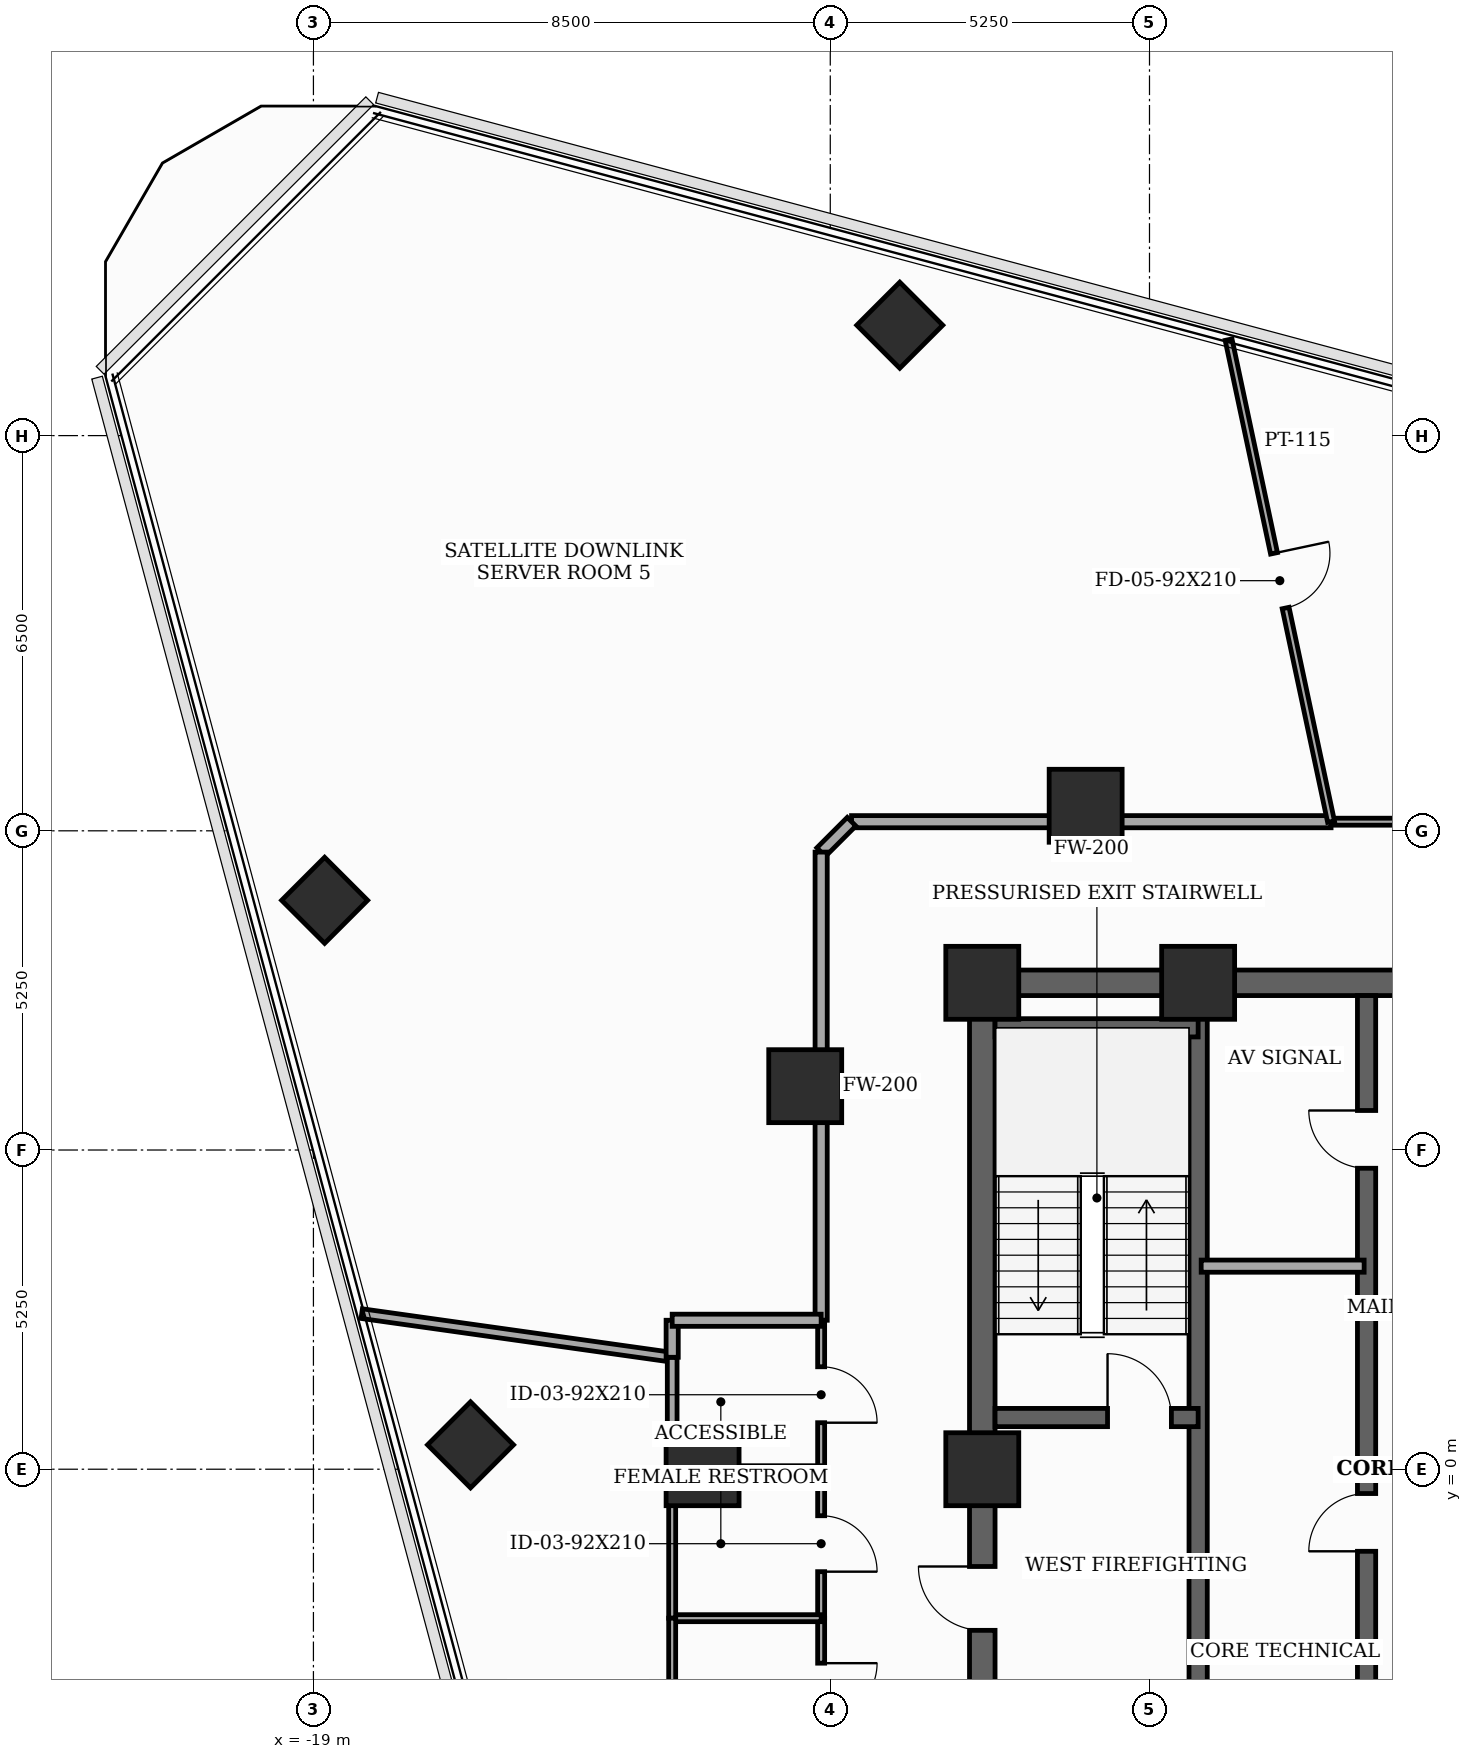
"""IFC4 building model, lengths in metres.
Left out: names, types, materials, properties, quantities, classifications, styles, units other than length and angle.
Written with IfcOpenShell. Run it as: python <this file> out.ifc"""

import sys

from ifc_helpers import new_model, si_unit, direction, frame, frame_2d, origin, origin_2d, place, context, subcontext, project, spatial, rectangle, extrude, element, fill, save


model = new_model("IFC4")
c1 = context("Model", 3, precision=1e-05, world=origin(), true_north=direction((0.0, 1.0)))
c2 = subcontext(c1, "Body", "Model", "MODEL_VIEW")
j1 = project(units=[si_unit("LENGTHUNIT", "METRE"), si_unit("PLANEANGLEUNIT", "RADIAN")], contexts=[c1])
p1 = place(None, origin())
s1 = spatial("IfcSite", under=j1, at=p1, CompositionType="ELEMENT")
p2 = place(p1, origin())
s2 = spatial("IfcBuilding", under=s1, at=p2, CompositionType="ELEMENT")
p3 = place(p2, frame((0.0, 0.0, 202.7)))
s3 = spatial("IfcBuildingStorey", under=s2, at=p3, CompositionType="ELEMENT", Elevation=202.7)
for number, where, z_axis, x_axis in (
    (1, (-4.45, 8.0, 0.0), (0.0, 0.0, 1.0), (1.0, 0.0, 0.0)),
    (2, (-8.0, 8.0, 0.0), (0.0, 0.0, 1.0), (1.0, 0.0, 0.0)),
    (3, (-8.0, 0.0, 0.0), (0.0, 0.0, 1.0), (1.0, 0.0, 0.0)),
    (4, (-6.3, 10.912, 0.0), (0.0, 0.0, 1.0), (1.0, 0.0, 0.0)),
    (5, (-10.912, 6.3, 0.0), (0.0, 0.0, 1.0), (1.0, 0.0, 0.0)),
    (6, (-12.6, 0.0, 0.0), (0.0, 0.0, 1.0), (1.0, 0.0, 0.0)),
):
    element("IfcColumn", number, at=place(p3, frame(where, z_axis=z_axis, x_axis=x_axis)), inside=s3, PredefinedType="COLUMN", context=c2, shape_type="SweptSolid", body=[
        extrude(rectangle(XDim=1.2, YDim=1.2, at=origin_2d()), origin(), (0.0, 0.0, 1.0), 3.7),
    ])
for number, where, z_axis, x_axis in (
    (7, (-9.357, 18.816, 0.0), (0.0, 0.0, 1.0), (0.707, 0.707, 0.0)),
    (8, (-18.816, 9.357, 0.0), (0.0, 0.0, 1.0), (0.707, 0.707, 0.0)),
    (9, (-16.416, 0.401, 0.0), (0.0, 0.0, 1.0), (0.707, 0.707, 0.0)),
):
    element("IfcColumn", number, at=place(p3, frame(where, z_axis=z_axis, x_axis=x_axis)), inside=s3, PredefinedType="COLUMN", context=c2, shape_type="SweptSolid", body=[
        extrude(rectangle(XDim=1.0, YDim=1.0, at=origin_2d()), origin(), (0.0, 0.0, 1.0), 3.7),
    ])
p4 = place(p3, frame((-8.0, -8.0, 0.0), z_axis=(0.0, 0.0, 1.0), x_axis=(0.0, 1.0, 0.0)))
e10 = element("IfcWall", 10, at=p4, inside=s3, PredefinedType="SHEAR", context=c2, shape_type="SweptSolid", body=[
    extrude(rectangle(XDim=16.0, YDim=0.42, at=frame_2d((8.0, 0.0))), origin(), (0.0, 0.0, 1.0), 3.5),
])
p5 = place(p4, frame((0.761, 0.0, 0.0)))
e11 = element("IfcOpeningElement", 11, at=p5, cuts=e10, PredefinedType="OPENING", context=c2, shape_type="SweptSolid", body=[
    extrude(rectangle(XDim=0.85, YDim=2.02, at=frame_2d((0.425, 1.01))), frame((0.0, 0.22, 0.0), z_axis=(0.0, -1.0, 0.0), x_axis=(1.0, 0.0, 0.0)), (0.0, 0.0, 1.0), 0.44),
])
p6 = place(p4, frame((5.35, 0.0, 0.0)))
e12 = element("IfcOpeningElement", 12, at=p6, cuts=e10, PredefinedType="OPENING", context=c2, shape_type="SweptSolid", body=[
    extrude(rectangle(XDim=1.05, YDim=2.15, at=frame_2d((0.525, 1.075))), frame((0.0, 0.22, 0.0), z_axis=(0.0, -1.0, 0.0), x_axis=(1.0, 0.0, 0.0)), (0.0, 0.0, 1.0), 0.44),
])
p7 = place(p3, frame((-8.0, 8.0, 0.0), z_axis=(0.0, 0.0, 1.0), x_axis=(1.0, 0.0, 0.0)))
e13 = element("IfcWall", 13, at=p7, inside=s3, PredefinedType="SHEAR", context=c2, shape_type="SweptSolid", body=[
    extrude(rectangle(XDim=16.0, YDim=0.42, at=frame_2d((8.0, 0.0))), origin(), (0.0, 0.0, 1.0), 3.5),
])
p8 = place(p7, frame((7.1, 0.0, 0.0)))
e14 = element("IfcOpeningElement", 14, at=p8, cuts=e13, PredefinedType="OPENING", context=c2, shape_type="SweptSolid", body=[
    extrude(rectangle(XDim=1.8, YDim=2.15, at=frame_2d((0.9, 1.075))), frame((0.0, 0.22, 0.0), z_axis=(0.0, -1.0, 0.0), x_axis=(1.0, 0.0, 0.0)), (0.0, 0.0, 1.0), 0.44),
])
p9 = place(p3, frame((-4.45, -7.79, 0.0), z_axis=(0.0, 0.0, 1.0), x_axis=(0.0, 1.0, 0.0)))
e15 = element("IfcWall", 15, at=p9, inside=s3, PredefinedType="SHEAR", context=c2, shape_type="SweptSolid", body=[
    extrude(rectangle(XDim=15.58, YDim=0.3, at=frame_2d((7.79, 0.0))), origin(), (0.0, 0.0, 1.0), 3.5),
])
p10 = place(p3, frame((-7.79, 0.85, 0.0), z_axis=(0.0, 0.0, 1.0), x_axis=(1.0, 0.0, 0.0)))
e16 = element("IfcWall", 16, at=p10, inside=s3, PredefinedType="SHEAR", context=c2, shape_type="SweptSolid", body=[
    extrude(rectangle(XDim=3.34, YDim=0.3, at=frame_2d((1.67, 0.0))), origin(), (0.0, 0.0, 1.0), 3.5),
])
p11 = place(p10, frame((1.85, 0.0, 0.0)))
e17 = element("IfcOpeningElement", 17, at=p11, cuts=e16, PredefinedType="OPENING", context=c2, shape_type="SweptSolid", body=[
    extrude(rectangle(XDim=1.05, YDim=2.15, at=frame_2d((0.525, 1.075))), frame((0.0, 0.16, 0.0), z_axis=(0.0, -1.0, 0.0), x_axis=(1.0, 0.0, 0.0)), (0.0, 0.0, 1.0), 0.32),
])
p12 = place(p3, frame((-7.79, 7.26, 0.0), z_axis=(0.0, 0.0, 1.0), x_axis=(1.0, 0.0, 0.0)))
e18 = element("IfcWall", 18, at=p12, inside=s3, PredefinedType="SHEAR", context=c2, shape_type="SweptSolid", body=[
    extrude(rectangle(XDim=3.34, YDim=0.3, at=frame_2d((1.67, 0.0))), origin(), (0.0, 0.0, 1.0), 3.5),
])
p13 = place(p3, frame((-1.68, -4.85, 0.0), z_axis=(0.0, 0.0, 1.0), x_axis=(0.0, 1.0, 0.0)))
e19 = element("IfcWall", 19, at=p13, inside=s3, PredefinedType="SHEAR", context=c2, shape_type="SweptSolid", body=[
    extrude(rectangle(XDim=12.64, YDim=0.3, at=frame_2d((6.32, 0.0))), origin(), (0.0, 0.0, 1.0), 3.5),
])
p14 = place(p13, frame((3.5, 0.0, 0.0)))
e20 = element("IfcOpeningElement", 20, at=p14, cuts=e19, PredefinedType="OPENING", context=c2, shape_type="SweptSolid", body=[
    extrude(rectangle(XDim=0.95, YDim=2.1, at=frame_2d((0.475, 1.05))), frame((0.0, 0.16, 0.0), z_axis=(0.0, -1.0, 0.0), x_axis=(1.0, 0.0, 0.0)), (0.0, 0.0, 1.0), 0.32),
])
p15 = place(p13, frame((9.8, 0.0, 0.0)))
e21 = element("IfcOpeningElement", 21, at=p15, cuts=e19, PredefinedType="OPENING", context=c2, shape_type="SweptSolid", body=[
    extrude(rectangle(XDim=0.95, YDim=2.1, at=frame_2d((0.475, 1.05))), frame((0.0, 0.16, 0.0), z_axis=(0.0, -1.0, 0.0), x_axis=(1.0, 0.0, 0.0)), (0.0, 0.0, 1.0), 0.32),
])
p16 = place(p3, frame((-4.4, 3.34, 0.0), z_axis=(0.0, 0.0, 1.0), x_axis=(1.0, 0.0, 0.0)))
e22 = element("IfcWall", 22, at=p16, inside=s3, PredefinedType="SOLIDWALL", context=c2, shape_type="SweptSolid", body=[
    extrude(rectangle(XDim=2.68, YDim=0.2, at=frame_2d((1.34, 0.0))), origin(), (0.0, 0.0, 1.0), 3.5),
])
p17 = place(p3, frame((-10.65, 0.0, 0.0), z_axis=(0.0, 0.0, 1.0), x_axis=(0.0, -1.0, 0.0)))
e23 = element("IfcWall", 23, at=p17, inside=s3, PredefinedType="PARTITIONING", context=c2, shape_type="SweptSolid", body=[
    extrude(rectangle(XDim=2.45, YDim=0.115, at=frame_2d((1.225, 0.0))), origin(), (0.0, 0.0, 1.0), 2.885),
])
p18 = place(p17, frame((0.765, 0.0, 0.0)))
e24 = element("IfcOpeningElement", 24, at=p18, cuts=e23, PredefinedType="OPENING", context=c2, shape_type="SweptSolid", body=[
    extrude(rectangle(XDim=0.92, YDim=2.1, at=frame_2d((0.46, 1.05))), frame((0.0, 0.067, 0.0), z_axis=(0.0, -1.0, 0.0), x_axis=(1.0, 0.0, 0.0)), (0.0, 0.0, 1.0), 0.135),
])
p19 = place(p3, frame((-10.65, -2.45, 0.0), z_axis=(0.0, 0.0, 1.0), x_axis=(0.0, -1.0, 0.0)))
e25 = element("IfcWall", 25, at=p19, inside=s3, PredefinedType="PARTITIONING", context=c2, shape_type="SweptSolid", body=[
    extrude(rectangle(XDim=2.4, YDim=0.115, at=frame_2d((1.2, 0.0))), origin(), (0.0, 0.0, 1.0), 3.5),
])
p20 = place(p19, frame((0.74, 0.0, 0.0)))
e26 = element("IfcOpeningElement", 26, at=p20, cuts=e25, PredefinedType="OPENING", context=c2, shape_type="SweptSolid", body=[
    extrude(rectangle(XDim=0.92, YDim=2.1, at=frame_2d((0.46, 1.05))), frame((0.0, 0.067, 0.0), z_axis=(0.0, -1.0, 0.0), x_axis=(1.0, 0.0, 0.0)), (0.0, 0.0, 1.0), 0.135),
])
p21 = place(p3, frame((10.15, 10.65, 0.0), z_axis=(0.0, 0.0, 1.0), x_axis=(-1.0, 0.0, 0.0)))
e27 = element("IfcWall", 27, at=p21, inside=s3, PredefinedType="PARTITIONING", context=c2, shape_type="SweptSolid", body=[
    extrude(rectangle(XDim=12.414, YDim=0.115, at=frame_2d((6.207, 0.0))), origin(), (0.0, 0.0, 1.0), 2.885),
])
p22 = place(p21, frame((7.222, 0.0, 0.0)))
e28 = element("IfcOpeningElement", 28, at=p22, cuts=e27, PredefinedType="OPENING", context=c2, shape_type="SweptSolid", body=[
    extrude(rectangle(XDim=0.95, YDim=2.1, at=frame_2d((0.475, 1.05))), frame((0.0, 0.067, 0.0), z_axis=(0.0, -1.0, 0.0), x_axis=(1.0, 0.0, 0.0)), (0.0, 0.0, 1.0), 0.135),
])
p23 = place(p3, frame((-2.264, 10.65, 0.0), z_axis=(0.0, 0.0, 1.0), x_axis=(-1.0, 0.0, 0.0)))
e29 = element("IfcWall", 29, at=p23, inside=s3, PredefinedType="SOLIDWALL", context=c2, shape_type="SweptSolid", body=[
    extrude(rectangle(XDim=7.886, YDim=0.2, at=frame_2d((3.943, 0.0))), origin(), (0.0, 0.0, 1.0), 2.885),
])
p24 = place(p3, frame((-10.15, 10.65, 0.0), z_axis=(0.0, 0.0, 1.0), x_axis=(-0.707106781187, -0.707106781187, 0.0)))
e30 = element("IfcWall", 30, at=p24, inside=s3, PredefinedType="SOLIDWALL", context=c2, shape_type="SweptSolid", body=[
    extrude(rectangle(XDim=0.707, YDim=0.2, at=frame_2d((0.354, 0.0))), origin(), (0.0, 0.0, 1.0), 3.5),
])
p25 = place(p3, frame((-10.65, 10.15, 0.0), z_axis=(0.0, 0.0, 1.0), x_axis=(0.0, -1.0, 0.0)))
e31 = element("IfcWall", 31, at=p25, inside=s3, PredefinedType="SOLIDWALL", context=c2, shape_type="SweptSolid", body=[
    extrude(rectangle(XDim=7.7, YDim=0.2, at=frame_2d((3.85, 0.0))), origin(), (0.0, 0.0, 1.0), 2.885),
])
p26 = place(p3, frame((-10.65, 2.45, 0.0), z_axis=(0.0, 0.0, 1.0), x_axis=(0.0, -1.0, 0.0)))
e32 = element("IfcWall", 32, at=p26, inside=s3, PredefinedType="PARTITIONING", context=c2, shape_type="SweptSolid", body=[
    extrude(rectangle(XDim=2.45, YDim=0.115, at=frame_2d((1.225, 0.0))), origin(), (0.0, 0.0, 1.0), 2.885),
])
p27 = place(p26, frame((0.765, 0.0, 0.0)))
e33 = element("IfcOpeningElement", 33, at=p27, cuts=e32, PredefinedType="OPENING", context=c2, shape_type="SweptSolid", body=[
    extrude(rectangle(XDim=0.92, YDim=2.1, at=frame_2d((0.46, 1.05))), frame((0.0, 0.067, 0.0), z_axis=(0.0, -1.0, 0.0), x_axis=(1.0, 0.0, 0.0)), (0.0, 0.0, 1.0), 0.135),
])
p28 = place(p3, frame((-13.1, -2.45, 0.0), z_axis=(0.0, 0.0, 1.0), x_axis=(1.0, 0.0, 0.0)))
e34 = element("IfcWall", 34, at=p28, inside=s3, PredefinedType="PARTITIONING", context=c2, shape_type="SweptSolid", body=[
    extrude(rectangle(XDim=2.45, YDim=0.115, at=frame_2d((1.225, 0.0))), origin(), (0.0, 0.0, 1.0), 2.885),
])
p29 = place(p3, frame((-13.1, 0.0, 0.0), z_axis=(0.0, 0.0, 1.0), x_axis=(0.0, -1.0, 0.0)))
e35 = element("IfcWall", 35, at=p29, inside=s3, PredefinedType="PARTITIONING", context=c2, shape_type="SweptSolid", body=[
    extrude(rectangle(XDim=2.45, YDim=0.115, at=frame_2d((1.225, 0.0))), origin(), (0.0, 0.0, 1.0), 2.975),
])
p30 = place(p3, frame((-10.65, 0.0, 0.0), z_axis=(0.0, 0.0, 1.0), x_axis=(-1.0, 0.0, 0.0)))
e36 = element("IfcWall", 36, at=p30, inside=s3, PredefinedType="PARTITIONING", context=c2, shape_type="SweptSolid", body=[
    extrude(rectangle(XDim=2.45, YDim=0.115, at=frame_2d((1.225, 0.0))), origin(), (0.0, 0.0, 1.0), 2.885),
])
p31 = place(p3, frame((-13.1, -2.45, 0.0), z_axis=(0.0, 0.0, 1.0), x_axis=(0.0, -1.0, 0.0)))
e37 = element("IfcWall", 37, at=p31, inside=s3, PredefinedType="PARTITIONING", context=c2, shape_type="SweptSolid", body=[
    extrude(rectangle(XDim=2.4, YDim=0.115, at=frame_2d((1.2, 0.0))), origin(), (0.0, 0.0, 1.0), 3.5),
])
p32 = place(p3, frame((-13.1, 1.841, 0.0), z_axis=(0.0, 0.0, 1.0), x_axis=(-0.990254946284, 0.139266440179, 0.0)))
e38 = element("IfcWall", 38, at=p32, inside=s3, PredefinedType="PARTITIONING", context=c2, shape_type="SweptSolid", body=[
    extrude(rectangle(XDim=5.156, YDim=0.16, at=frame_2d((2.578, 0.0))), origin(), (0.0, 0.0, 1.0), 2.975),
])
p33 = place(p3, frame((-13.1, 0.0, 0.0), z_axis=(0.0, 0.0, 1.0), x_axis=(0.0, 1.0, 0.0)))
e39 = element("IfcWall", 39, at=p33, inside=s3, PredefinedType="PARTITIONING", context=c2, shape_type="SweptSolid", body=[
    extrude(rectangle(XDim=1.841, YDim=0.16, at=frame_2d((0.92, 0.0))), origin(), (0.0, 0.0, 1.0), 2.975),
])
p34 = place(p3, frame((-3.949, 18.578, 0.0), z_axis=(0.0, 0.0, 1.0), x_axis=(0.20795313807, -0.978138789931, 0.0)))
e40 = element("IfcWall", 40, at=p34, inside=s3, PredefinedType="PARTITIONING", context=c2, shape_type="SweptSolid", body=[
    extrude(rectangle(XDim=8.105, YDim=0.115, at=frame_2d((4.053, 0.0))), origin(), (0.0, 0.0, 1.0), 2.885),
])
p35 = place(p34, frame((3.593, 0.0, 0.0)))
e41 = element("IfcOpeningElement", 41, at=p35, cuts=e40, PredefinedType="OPENING", context=c2, shape_type="SweptSolid", body=[
    extrude(rectangle(XDim=0.92, YDim=2.1, at=frame_2d((0.46, 1.05))), frame((0.0, 0.067, 0.0), z_axis=(0.0, -1.0, 0.0), x_axis=(1.0, 0.0, 0.0)), (0.0, 0.0, 1.0), 0.135),
])
p36 = place(p3, frame((-13.1, 1.841, 0.0), z_axis=(0.0, 0.0, 1.0), x_axis=(0.0, 1.0, 0.0)))
e42 = element("IfcWall", 42, at=p36, inside=s3, PredefinedType="SOLIDWALL", context=c2, shape_type="SweptSolid", body=[
    extrude(rectangle(XDim=0.609, YDim=0.2, at=frame_2d((0.304, 0.0))), origin(), (0.0, 0.0, 1.0), 3.5),
])
p37 = place(p3, frame((-13.1, 2.45, 0.0), z_axis=(0.0, 0.0, 1.0), x_axis=(1.0, 0.0, 0.0)))
e43 = element("IfcWall", 43, at=p37, inside=s3, PredefinedType="SOLIDWALL", context=c2, shape_type="SweptSolid", body=[
    extrude(rectangle(XDim=2.45, YDim=0.2, at=frame_2d((1.225, 0.0))), origin(), (0.0, 0.0, 1.0), 2.885),
])
p38 = place(p6, origin())
e44 = element("IfcDoor", 44, at=p38, inside=s3, OperationType="SINGLE_SWING_RIGHT", PredefinedType="DOOR", context=c2, shape_type="SweptSolid", body=[
    extrude(rectangle(XDim=1.05, YDim=2.15, at=frame_2d((0.525, 1.075))), frame((0.0, 0.025, 0.0), z_axis=(0.0, -1.0, 0.0), x_axis=(1.0, 0.0, 0.0)), (0.0, 0.0, 1.0), 0.05),
])
fill(e12, e44)
p39 = place(p11, origin())
e45 = element("IfcDoor", 45, at=p39, inside=s3, OperationType="SINGLE_SWING_LEFT", PredefinedType="DOOR", context=c2, shape_type="SweptSolid", body=[
    extrude(rectangle(XDim=1.05, YDim=2.15, at=frame_2d((0.525, 1.075))), frame((0.0, 0.025, 0.0), z_axis=(0.0, -1.0, 0.0), x_axis=(1.0, 0.0, 0.0)), (0.0, 0.0, 1.0), 0.05),
])
fill(e17, e45)
p40 = place(p14, origin())
e46 = element("IfcDoor", 46, at=p40, inside=s3, OperationType="SINGLE_SWING_LEFT", PredefinedType="DOOR", context=c2, shape_type="SweptSolid", body=[
    extrude(rectangle(XDim=0.95, YDim=2.1, at=frame_2d((0.475, 1.05))), frame((0.0, 0.025, 0.0), z_axis=(0.0, -1.0, 0.0), x_axis=(1.0, 0.0, 0.0)), (0.0, 0.0, 1.0), 0.05),
])
fill(e20, e46)
p41 = place(p15, origin())
e47 = element("IfcDoor", 47, at=p41, inside=s3, OperationType="SINGLE_SWING_RIGHT", PredefinedType="DOOR", context=c2, shape_type="SweptSolid", body=[
    extrude(rectangle(XDim=0.95, YDim=2.1, at=frame_2d((0.475, 1.05))), frame((0.0, 0.025, 0.0), z_axis=(0.0, -1.0, 0.0), x_axis=(1.0, 0.0, 0.0)), (0.0, 0.0, 1.0), 0.05),
])
fill(e21, e47)
p42 = place(p18, origin())
e48 = element("IfcDoor", 48, at=p42, inside=s3, OperationType="SINGLE_SWING_RIGHT", PredefinedType="DOOR", context=c2, shape_type="SweptSolid", body=[
    extrude(rectangle(XDim=0.92, YDim=2.1, at=frame_2d((0.46, 1.05))), frame((0.0, 0.025, 0.0), z_axis=(0.0, -1.0, 0.0), x_axis=(1.0, 0.0, 0.0)), (0.0, 0.0, 1.0), 0.05),
])
fill(e24, e48)
p43 = place(p20, origin())
e49 = element("IfcDoor", 49, at=p43, inside=s3, OperationType="SINGLE_SWING_LEFT", PredefinedType="DOOR", context=c2, shape_type="SweptSolid", body=[
    extrude(rectangle(XDim=0.92, YDim=2.1, at=frame_2d((0.46, 1.05))), frame((0.0, 0.025, 0.0), z_axis=(0.0, -1.0, 0.0), x_axis=(1.0, 0.0, 0.0)), (0.0, 0.0, 1.0), 0.05),
])
fill(e26, e49)
p44 = place(p27, origin())
e50 = element("IfcDoor", 50, at=p44, inside=s3, OperationType="SINGLE_SWING_RIGHT", PredefinedType="DOOR", context=c2, shape_type="SweptSolid", body=[
    extrude(rectangle(XDim=0.92, YDim=2.1, at=frame_2d((0.46, 1.05))), frame((0.0, 0.025, 0.0), z_axis=(0.0, -1.0, 0.0), x_axis=(1.0, 0.0, 0.0)), (0.0, 0.0, 1.0), 0.05),
])
fill(e33, e50)
p45 = place(p35, origin())
e51 = element("IfcDoor", 51, at=p45, inside=s3, OperationType="SINGLE_SWING_LEFT", PredefinedType="DOOR", context=c2, shape_type="SweptSolid", body=[
    extrude(rectangle(XDim=0.92, YDim=2.1, at=frame_2d((0.46, 1.05))), frame((0.0, 0.025, 0.0), z_axis=(0.0, -1.0, 0.0), x_axis=(1.0, 0.0, 0.0)), (0.0, 0.0, 1.0), 0.05),
])
fill(e41, e51)
save(model, sys.argv[1])
